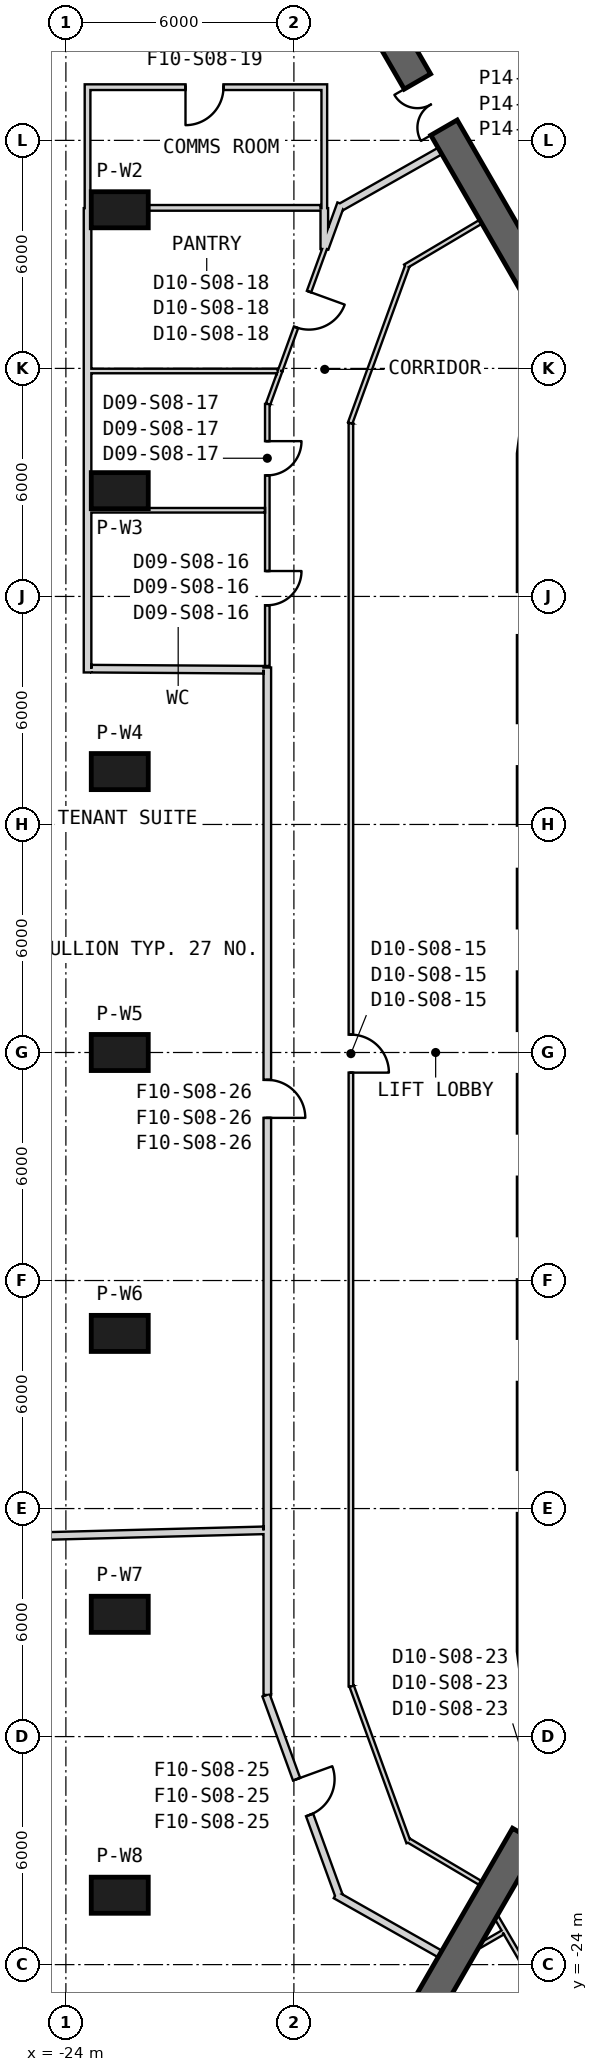
"""IFC4 building model, lengths in metres.
Left out: names, types, materials, properties, quantities, classifications, styles, units other than length and angle.
Written with IfcOpenShell. Run it as: python <this file> out.ifc"""

import sys

from ifc_helpers import new_model, si_unit, direction, frame, frame_2d, origin, origin_2d, place, context, subcontext, project, spatial, polyline, rectangle, outline, extrude, element, fill, save


model = new_model("IFC4")
c1 = context("Model", 3, precision=1e-05, world=origin(), true_north=direction((0.0, 1.0)))
c2 = subcontext(c1, "Body", "Model", "MODEL_VIEW")
j1 = project(units=[si_unit("LENGTHUNIT", "METRE"), si_unit("PLANEANGLEUNIT", "RADIAN")], contexts=[c1])
p1 = place(None, origin())
s1 = spatial("IfcSite", under=j1, at=p1, CompositionType="ELEMENT")
p2 = place(p1, origin())
s2 = spatial("IfcBuilding", under=s1, at=p2, CompositionType="ELEMENT")
p3 = place(p2, frame((0.0, 0.0, 143.9)))
s3 = spatial("IfcBuildingStorey", under=s2, at=p3, CompositionType="ELEMENT", Elevation=143.9)
for number, where, z_axis, x_axis in (
    (1, (-22.583, 22.174, 0.0), (0.0, 0.0, 1.0), (-1.0, 0.0, 0.0)),
    (2, (-22.583, 14.783, 0.0), (0.0, 0.0, 1.0), (-1.0, 0.0, 0.0)),
    (3, (-22.583, 7.391, 0.0), (0.0, 0.0, 1.0), (-1.0, 0.0, 0.0)),
    (4, (-22.583, 0.0, 0.0), (0.0, 0.0, 1.0), (-1.0, 0.0, 0.0)),
    (5, (-22.583, -7.391, 0.0), (0.0, 0.0, 1.0), (-1.0, 0.0, 0.0)),
    (6, (-22.583, -14.783, 0.0), (0.0, 0.0, 1.0), (-1.0, 0.0, 0.0)),
    (7, (-22.583, -22.174, 0.0), (0.0, 0.0, 1.0), (-1.0, 0.0, 0.0)),
):
    element("IfcColumn", number, at=place(p3, frame(where, z_axis=z_axis, x_axis=x_axis)), inside=s3, PredefinedType="COLUMN", context=c2, shape_type="SweptSolid", body=[
        extrude(rectangle(XDim=1.5, YDim=0.95, at=origin_2d()), origin(), (0.0, 0.0, 1.0), 4.1),
    ])
p4 = place(p3, frame((-11.65, 15.762, 0.0), z_axis=(0.0, 0.0, 1.0), x_axis=(0.0, -1.0, 0.0)))
e8 = element("IfcWall", 8, at=p4, inside=s3, PredefinedType="SHEAR", context=c2, shape_type="SweptSolid", body=[
    extrude(rectangle(XDim=31.523, YDim=0.9, at=frame_2d((15.762, 0.0))), origin(), (0.0, 0.0, 1.0), 4.1),
])
p5 = place(p4, frame((7.062, 0.0, 0.0)))
e9 = element("IfcOpeningElement", 9, at=p5, cuts=e8, PredefinedType="OPENING", context=c2, shape_type="SweptSolid", body=[
    extrude(rectangle(XDim=1.2, YDim=2.4, at=frame_2d((0.6, 1.2))), frame((0.0, 0.46, 0.0), z_axis=(0.0, -1.0, 0.0), x_axis=(1.0, 0.0, 0.0)), (0.0, 0.0, 1.0), 0.92),
])
p6 = place(p4, frame((9.762, 0.0, 0.0)))
e10 = element("IfcOpeningElement", 10, at=p6, cuts=e8, PredefinedType="OPENING", context=c2, shape_type="SweptSolid", body=[
    extrude(rectangle(XDim=1.2, YDim=2.4, at=frame_2d((0.6, 1.2))), frame((0.0, 0.46, 0.0), z_axis=(0.0, -1.0, 0.0), x_axis=(1.0, 0.0, 0.0)), (0.0, 0.0, 1.0), 0.92),
])
p7 = place(p4, frame((12.462, 0.0, 0.0)))
e11 = element("IfcOpeningElement", 11, at=p7, cuts=e8, PredefinedType="OPENING", context=c2, shape_type="SweptSolid", body=[
    extrude(rectangle(XDim=1.2, YDim=2.4, at=frame_2d((0.6, 1.2))), frame((0.0, 0.46, 0.0), z_axis=(0.0, -1.0, 0.0), x_axis=(1.0, 0.0, 0.0)), (0.0, 0.0, 1.0), 0.92),
])
p8 = place(p4, frame((15.162, 0.0, 0.0)))
e12 = element("IfcOpeningElement", 12, at=p8, cuts=e8, PredefinedType="OPENING", context=c2, shape_type="SweptSolid", body=[
    extrude(rectangle(XDim=1.2, YDim=2.4, at=frame_2d((0.6, 1.2))), frame((0.0, 0.46, 0.0), z_axis=(0.0, -1.0, 0.0), x_axis=(1.0, 0.0, 0.0)), (0.0, 0.0, 1.0), 0.92),
])
p9 = place(p4, frame((17.862, 0.0, 0.0)))
e13 = element("IfcOpeningElement", 13, at=p9, cuts=e8, PredefinedType="OPENING", context=c2, shape_type="SweptSolid", body=[
    extrude(rectangle(XDim=1.2, YDim=2.4, at=frame_2d((0.6, 1.2))), frame((0.0, 0.46, 0.0), z_axis=(0.0, -1.0, 0.0), x_axis=(1.0, 0.0, 0.0)), (0.0, 0.0, 1.0), 0.92),
])
p10 = place(p4, frame((20.562, 0.0, 0.0)))
e14 = element("IfcOpeningElement", 14, at=p10, cuts=e8, PredefinedType="OPENING", context=c2, shape_type="SweptSolid", body=[
    extrude(rectangle(XDim=1.2, YDim=2.4, at=frame_2d((0.6, 1.2))), frame((0.0, 0.46, 0.0), z_axis=(0.0, -1.0, 0.0), x_axis=(1.0, 0.0, 0.0)), (0.0, 0.0, 1.0), 0.92),
])
p11 = place(p4, frame((23.262, 0.0, 0.0)))
e15 = element("IfcOpeningElement", 15, at=p11, cuts=e8, PredefinedType="OPENING", context=c2, shape_type="SweptSolid", body=[
    extrude(rectangle(XDim=1.2, YDim=2.4, at=frame_2d((0.6, 1.2))), frame((0.0, 0.46, 0.0), z_axis=(0.0, -1.0, 0.0), x_axis=(1.0, 0.0, 0.0)), (0.0, 0.0, 1.0), 0.92),
])
p12 = place(p4, frame((3.612, 0.0, 0.0)))
e16 = element("IfcOpeningElement", 16, at=p12, cuts=e8, PredefinedType="OPENING", context=c2, shape_type="SweptSolid", body=[
    extrude(rectangle(XDim=1.2, YDim=2.4, at=frame_2d((0.6, 1.2))), frame((0.0, 0.46, 0.0), z_axis=(0.0, -1.0, 0.0), x_axis=(1.0, 0.0, 0.0)), (0.0, 0.0, 1.0), 0.92),
])
p13 = place(p4, frame((26.712, 0.0, 0.0)))
e17 = element("IfcOpeningElement", 17, at=p13, cuts=e8, PredefinedType="OPENING", context=c2, shape_type="SweptSolid", body=[
    extrude(rectangle(XDim=1.2, YDim=2.4, at=frame_2d((0.6, 1.2))), frame((0.0, 0.46, 0.0), z_axis=(0.0, -1.0, 0.0), x_axis=(1.0, 0.0, 0.0)), (0.0, 0.0, 1.0), 0.92),
])
p14 = place(p3, origin())
e18 = element("IfcWall", 18, at=p14, inside=s3, PredefinedType="SHEAR", context=c2, shape_type="SweptSolid", body=[
    extrude(outline(polyline([(-7.6, 18.36), (-8.323, 18.659), (-9.1, 18.762), (-9.876, 18.659), (-10.6, 18.36), (-11.221, 17.883), (-11.698, 17.262), (-11.998, 16.538), (-12.1, 15.762), (-11.2, 15.762), (-11.128, 16.305), (-10.919, 16.812), (-10.585, 17.247), (-10.15, 17.58), (-9.644, 17.79), (-9.1, 17.862), (-8.556, 17.79), (-8.05, 17.58), (-7.6, 18.36)])), origin(), (0.0, 0.0, 1.0), 4.1),
])
p15 = place(p3, origin())
e19 = element("IfcWall", 19, at=p15, inside=s3, PredefinedType="SHEAR", context=c2, shape_type="SweptSolid", body=[
    extrude(outline(polyline([(-12.1, -15.762), (-11.998, -16.538), (-11.698, -17.262), (-11.221, -17.883), (-10.6, -18.36), (-9.876, -18.659), (-9.1, -18.762), (-8.323, -18.659), (-7.6, -18.36), (-8.05, -17.58), (-8.556, -17.79), (-9.1, -17.862), (-9.644, -17.79), (-10.15, -17.58), (-10.585, -17.247), (-10.919, -16.812), (-11.128, -16.305), (-11.2, -15.762), (-12.1, -15.762)])), origin(), (0.0, 0.0, 1.0), 4.1),
])
p16 = place(p3, frame((-10.575, 18.316, 0.0), z_axis=(0.0, 0.0, 1.0), x_axis=(-0.500002326941, 0.86602406032, 0.0)))
e20 = element("IfcWall", 20, at=p16, inside=s3, PredefinedType="SHEAR", context=c2, shape_type="SweptSolid", body=[
    extrude(rectangle(XDim=12.384, YDim=0.8, at=frame_2d((6.192, 0.0))), origin(), (0.0, 0.0, 1.0), 4.1),
])
p17 = place(p16, frame((6.95, 0.0, 0.0)))
e21 = element("IfcOpeningElement", 21, at=p17, cuts=e20, PredefinedType="OPENING", context=c2, shape_type="SweptSolid", body=[
    extrude(rectangle(XDim=1.4, YDim=2.4, at=frame_2d((0.7, 1.2))), frame((0.0, 0.41, 0.0), z_axis=(0.0, -1.0, 0.0), x_axis=(1.0, 0.0, 0.0)), (0.0, 0.0, 1.0), 0.82),
])
p18 = place(p3, frame((-10.575, -18.316, 0.0), z_axis=(0.0, 0.0, 1.0), x_axis=(-0.500002326941, -0.86602406032, 0.0)))
e22 = element("IfcWall", 22, at=p18, inside=s3, PredefinedType="SHEAR", context=c2, shape_type="SweptSolid", body=[
    extrude(rectangle(XDim=12.384, YDim=0.8, at=frame_2d((6.192, 0.0))), origin(), (0.0, 0.0, 1.0), 4.1),
])
p19 = place(p18, frame((1.25, 0.0, 0.0)))
e23 = element("IfcOpeningElement", 23, at=p19, cuts=e22, PredefinedType="OPENING", context=c2, shape_type="SweptSolid", body=[
    extrude(rectangle(XDim=1.4, YDim=2.4, at=frame_2d((0.7, 1.2))), frame((0.0, 0.41, 0.0), z_axis=(0.0, -1.0, 0.0), x_axis=(1.0, 0.0, 0.0)), (0.0, 0.0, 1.0), 0.82),
])
p20 = place(p3, frame((-13.082, 21.859, 0.0), z_axis=(0.0, 0.0, 1.0), x_axis=(-0.860286384661, -0.509811079095, 0.0)))
e24 = element("IfcWall", 24, at=p20, inside=s3, PredefinedType="PARTITIONING", context=c2, shape_type="SweptSolid", body=[
    extrude(rectangle(XDim=2.311, YDim=0.12, at=frame_2d((1.155, 0.0))), origin(), (0.0, 0.0, 1.0), 3.8),
])
p21 = place(p3, frame((-15.017, 20.692, 0.0), z_axis=(0.0, 0.0, 1.0), x_axis=(-0.342028368186, -0.939689627141, 0.0)))
e25 = element("IfcWall", 25, at=p21, inside=s3, PredefinedType="PARTITIONING", context=c2, shape_type="SweptSolid", body=[
    extrude(rectangle(XDim=4.397, YDim=0.12, at=frame_2d((2.198, 0.0))), origin(), (0.0, 0.0, 1.0), 2.88),
])
p22 = place(p3, frame((-16.5, 16.557, 0.0), z_axis=(0.0, 0.0, 1.0), x_axis=(0.0, -1.0, 0.0)))
e26 = element("IfcWall", 26, at=p22, inside=s3, PredefinedType="PARTITIONING", context=c2, shape_type="SweptSolid", body=[
    extrude(rectangle(XDim=33.234, YDim=0.12, at=frame_2d((16.617, 0.0))), origin(), (0.0, 0.0, 1.0), 2.98),
])
p23 = place(p22, frame((16.087, 0.0, 0.0)))
e27 = element("IfcOpeningElement", 27, at=p23, cuts=e26, PredefinedType="OPENING", context=c2, shape_type="SweptSolid", body=[
    extrude(rectangle(XDim=1.0, YDim=2.1, at=frame_2d((0.5, 1.05))), frame((0.0, 0.07, 0.0), z_axis=(0.0, -1.0, 0.0), x_axis=(1.0, 0.0, 0.0)), (0.0, 0.0, 1.0), 0.14),
])
p24 = place(p3, frame((-16.479, -16.673, 0.0), z_axis=(0.0, 0.0, 1.0), x_axis=(0.342025144217, -0.939690800595, 0.0)))
e28 = element("IfcWall", 28, at=p24, inside=s3, PredefinedType="PARTITIONING", context=c2, shape_type="SweptSolid", body=[
    extrude(rectangle(XDim=4.378, YDim=0.12, at=frame_2d((2.189, 0.0))), origin(), (0.0, 0.0, 1.0), 2.88),
])
p25 = place(p3, frame((-14.983, -20.732, 0.0), z_axis=(0.0, 0.0, 1.0), x_axis=(0.860268204019, -0.509841756973, 0.0)))
e29 = element("IfcWall", 29, at=p25, inside=s3, PredefinedType="PARTITIONING", context=c2, shape_type="SweptSolid", body=[
    extrude(rectangle(XDim=2.21, YDim=0.12, at=frame_2d((1.105, 0.0))), origin(), (0.0, 0.0, 1.0), 3.8),
])
p26 = place(p3, frame((-16.903, -22.166, 0.0), z_axis=(0.0, 0.0, 1.0), x_axis=(0.870335069356, -0.492460015686, 0.0)))
e30 = element("IfcWall", 30, at=p26, inside=s3, PredefinedType="PARTITIONING", context=c2, shape_type="SweptSolid", body=[
    extrude(rectangle(XDim=3.156, YDim=0.2, at=frame_2d((1.578, 0.0))), origin(), (0.0, 0.0, 1.0), 2.88),
])
p27 = place(p3, frame((-18.734, -16.911, 0.0), z_axis=(0.0, 0.0, 1.0), x_axis=(0.342022840992, -0.939691638911, 0.0)))
e31 = element("IfcWall", 31, at=p27, inside=s3, PredefinedType="PARTITIONING", context=c2, shape_type="SweptSolid", body=[
    extrude(rectangle(XDim=5.605, YDim=0.2, at=frame_2d((2.802, 0.0))), origin(), (0.0, 0.0, 1.0), 2.88),
])
p28 = place(p27, frame((2.352, 0.0, 0.0)))
e32 = element("IfcOpeningElement", 32, at=p28, cuts=e31, PredefinedType="OPENING", context=c2, shape_type="SweptSolid", body=[
    extrude(rectangle(XDim=1.0, YDim=2.1, at=frame_2d((0.5, 1.05))), frame((0.0, 0.11, 0.0), z_axis=(0.0, -1.0, 0.0), x_axis=(1.0, 0.0, 0.0)), (0.0, 0.0, 1.0), 0.22),
])
p29 = place(p3, frame((-18.7, 10.13, 0.0), z_axis=(0.0, 0.0, 1.0), x_axis=(0.0, -1.0, 0.0)))
e33 = element("IfcWall", 33, at=p29, inside=s3, PredefinedType="PARTITIONING", context=c2, shape_type="SweptSolid", body=[
    extrude(rectangle(XDim=27.035, YDim=0.2, at=frame_2d((13.517, 0.0))), origin(), (0.0, 0.0, 1.0), 3.08),
])
p30 = place(p29, frame((10.85, 0.0, 0.0)))
e34 = element("IfcOpeningElement", 34, at=p30, cuts=e33, PredefinedType="OPENING", context=c2, shape_type="SweptSolid", body=[
    extrude(rectangle(XDim=1.0, YDim=2.1, at=frame_2d((0.5, 1.05))), frame((0.0, 0.11, 0.0), z_axis=(0.0, -1.0, 0.0), x_axis=(1.0, 0.0, 0.0)), (0.0, 0.0, 1.0), 0.22),
])
p31 = place(p3, frame((-16.76, 22.333, 0.0), z_axis=(0.0, 0.0, 1.0), x_axis=(-0.342041387985, -0.93968488809, 0.0)))
e35 = element("IfcWall", 35, at=p31, inside=s3, PredefinedType="PARTITIONING", context=c2, shape_type="SweptSolid", body=[
    extrude(rectangle(XDim=1.248, YDim=0.2, at=frame_2d((0.624, 0.0))), origin(), (0.0, 0.0, 1.0), 2.88),
])
p32 = place(p3, frame((-14.156, 23.719, 0.0), z_axis=(0.0, 0.0, 1.0), x_axis=(-0.870320915518, -0.492485029226, 0.0)))
e36 = element("IfcWall", 36, at=p32, inside=s3, PredefinedType="PARTITIONING", context=c2, shape_type="SweptSolid", body=[
    extrude(rectangle(XDim=2.99, YDim=0.2, at=frame_2d((1.495, 0.0))), origin(), (0.0, 0.0, 1.0), 2.88),
])
p33 = place(p3, frame((-18.7, 17.065, 0.0), z_axis=(0.0, 0.0, 1.0), x_axis=(0.0, -1.0, 0.0)))
e37 = element("IfcWall", 37, at=p33, inside=s3, PredefinedType="PARTITIONING", context=c2, shape_type="SweptSolid", body=[
    extrude(rectangle(XDim=6.895, YDim=0.12, at=frame_2d((3.447, 0.0))), origin(), (0.0, 0.0, 1.0), 3.08),
])
p34 = place(p33, frame((4.396, 0.0, 0.0)))
e38 = element("IfcOpeningElement", 38, at=p34, cuts=e37, PredefinedType="OPENING", context=c2, shape_type="SweptSolid", body=[
    extrude(rectangle(XDim=0.9, YDim=2.1, at=frame_2d((0.45, 1.05))), frame((0.0, 0.07, 0.0), z_axis=(0.0, -1.0, 0.0), x_axis=(1.0, 0.0, 0.0)), (0.0, 0.0, 1.0), 0.14),
])
p35 = place(p33, frame((0.979, 0.0, 0.0)))
e39 = element("IfcOpeningElement", 39, at=p35, cuts=e37, PredefinedType="OPENING", context=c2, shape_type="SweptSolid", body=[
    extrude(rectangle(XDim=0.9, YDim=2.1, at=frame_2d((0.45, 1.05))), frame((0.0, 0.07, 0.0), z_axis=(0.0, -1.0, 0.0), x_axis=(1.0, 0.0, 0.0)), (0.0, 0.0, 1.0), 0.14),
])
p36 = place(p3, frame((-17.188, 21.16, 0.0), z_axis=(0.0, 0.0, 1.0), x_axis=(-0.342046352126, -0.939683081149, 0.0)))
e40 = element("IfcWall", 40, at=p36, inside=s3, PredefinedType="PARTITIONING", context=c2, shape_type="SweptSolid", body=[
    extrude(rectangle(XDim=3.425, YDim=0.12, at=frame_2d((1.713, 0.0))), origin(), (0.0, 0.0, 1.0), 2.98),
])
p37 = place(p36, frame((1.213, 0.0, 0.0)))
e41 = element("IfcOpeningElement", 41, at=p37, cuts=e40, PredefinedType="OPENING", context=c2, shape_type="SweptSolid", body=[
    extrude(rectangle(XDim=1.0, YDim=2.1, at=frame_2d((0.5, 1.05))), frame((0.0, 0.07, 0.0), z_axis=(0.0, -1.0, 0.0), x_axis=(1.0, 0.0, 0.0)), (0.0, 0.0, 1.0), 0.14),
])
p38 = place(p3, frame((-18.359, 17.941, 0.0), z_axis=(0.0, 0.0, 1.0), x_axis=(-0.341910451958, -0.939732537929, 0.0)))
e42 = element("IfcWall", 42, at=p38, inside=s3, PredefinedType="PARTITIONING", context=c2, shape_type="SweptSolid", body=[
    extrude(rectangle(XDim=0.937, YDim=0.12, at=frame_2d((0.468, 0.0))), origin(), (0.0, 0.0, 1.0), 2.98),
])
p39 = place(p3, frame((-25.457, -12.746, 0.0), z_axis=(0.0, 0.0, 1.0), x_axis=(0.999663993994, 0.025921016788, 0.0)))
e43 = element("IfcWall", 43, at=p39, inside=s3, PredefinedType="PARTITIONING", context=c2, shape_type="SweptSolid", body=[
    extrude(rectangle(XDim=6.659, YDim=0.2, at=frame_2d((3.33, 0.0))), origin(), (0.0, 0.0, 1.0), 3.08),
])
p40 = place(p3, frame((-23.43, 10.0, 0.0), z_axis=(0.0, 0.0, 1.0), x_axis=(0.0, 1.0, 0.0)))
e44 = element("IfcWall", 44, at=p40, inside=s3, PredefinedType="PARTITIONING", context=c2, shape_type="SweptSolid", body=[
    extrude(rectangle(XDim=7.932, YDim=0.2, at=frame_2d((3.966, 0.0))), origin(), (0.0, 0.0, 1.0), 3.8),
])
p41 = place(p3, frame((-23.43, 17.932, 0.0), z_axis=(0.0, 0.0, 1.0), x_axis=(0.0, 1.0, 0.0)))
e45 = element("IfcWall", 45, at=p41, inside=s3, PredefinedType="PARTITIONING", context=c2, shape_type="SweptSolid", body=[
    extrude(rectangle(XDim=4.285, YDim=0.2, at=frame_2d((2.142, 0.0))), origin(), (0.0, 0.0, 1.0), 3.8),
])
p42 = place(p3, frame((-23.33, 10.099, 0.0), z_axis=(0.0, 0.0, 1.0), x_axis=(0.999979779172, -0.006359343247, 0.0)))
e46 = element("IfcWall", 46, at=p42, inside=s3, PredefinedType="PARTITIONING", context=c2, shape_type="SweptSolid", body=[
    extrude(rectangle(XDim=4.53, YDim=0.2, at=frame_2d((2.265, 0.0))), origin(), (0.0, 0.0, 1.0), 3.8),
])
p43 = place(p3, frame((-17.2, 21.141, 0.0), z_axis=(0.0, 0.0, 1.0), x_axis=(0.0, 1.0, 0.0)))
e47 = element("IfcWall", 47, at=p43, inside=s3, PredefinedType="PARTITIONING", context=c2, shape_type="SweptSolid", body=[
    extrude(rectangle(XDim=1.075, YDim=0.2, at=frame_2d((0.538, 0.0))), origin(), (0.0, 0.0, 1.0), 2.88),
])
p44 = place(p3, frame((-17.2, 22.217, 0.0), z_axis=(0.0, 0.0, 1.0), x_axis=(0.0, 1.0, 0.0)))
e48 = element("IfcWall", 48, at=p44, inside=s3, PredefinedType="PLUMBINGWALL", context=c2, shape_type="SweptSolid", body=[
    extrude(rectangle(XDim=3.259, YDim=0.15, at=frame_2d((1.629, 0.0))), origin(), (0.0, 0.0, 1.0), 2.88),
])
p45 = place(p3, frame((-17.275, 25.4, 0.0), z_axis=(0.0, 0.0, 1.0), x_axis=(-1.0, 0.0, 0.0)))
e49 = element("IfcWall", 49, at=p45, inside=s3, PredefinedType="PLUMBINGWALL", context=c2, shape_type="SweptSolid", body=[
    extrude(rectangle(XDim=6.23, YDim=0.15, at=frame_2d((3.115, 0.0))), origin(), (0.0, 0.0, 1.0), 2.88),
])
p46 = place(p45, frame((2.577, 0.0, 0.0)))
e50 = element("IfcOpeningElement", 50, at=p46, cuts=e49, PredefinedType="OPENING", context=c2, shape_type="SweptSolid", body=[
    extrude(rectangle(XDim=1.0, YDim=2.1, at=frame_2d((0.5, 1.05))), frame((0.0, 0.085, 0.0), z_axis=(0.0, -1.0, 0.0), x_axis=(1.0, 0.0, 0.0)), (0.0, 0.0, 1.0), 0.17),
])
p47 = place(p3, frame((-23.43, 22.217, 0.0), z_axis=(0.0, 0.0, 1.0), x_axis=(0.0, 1.0, 0.0)))
e51 = element("IfcWall", 51, at=p47, inside=s3, PredefinedType="PLUMBINGWALL", context=c2, shape_type="SweptSolid", body=[
    extrude(rectangle(XDim=3.108, YDim=0.15, at=frame_2d((1.554, 0.0))), origin(), (0.0, 0.0, 1.0), 3.8),
])
p48 = place(p3, frame((-18.76, 14.267, 0.0), z_axis=(0.0, 0.0, 1.0), x_axis=(-1.0, 0.0, 0.0)))
e52 = element("IfcWall", 52, at=p48, inside=s3, PredefinedType="PARTITIONING", context=c2, shape_type="SweptSolid", body=[
    extrude(rectangle(XDim=4.57, YDim=0.12, at=frame_2d((2.285, 0.0))), origin(), (0.0, 0.0, 1.0), 3.08),
])
p49 = place(p3, frame((-23.33, 17.932, 0.0), z_axis=(0.0, 0.0, 1.0), x_axis=(1.0, 0.0, 0.0)))
e53 = element("IfcWall", 53, at=p49, inside=s3, PredefinedType="PARTITIONING", context=c2, shape_type="SweptSolid", body=[
    extrude(rectangle(XDim=4.904, YDim=0.12, at=frame_2d((2.452, 0.0))), origin(), (0.0, 0.0, 1.0), 2.98),
])
p50 = place(p3, frame((-17.3, 22.224, 0.0), z_axis=(0.0, 0.0, 1.0), x_axis=(-1.0, 0.0, 0.0)))
e54 = element("IfcWall", 54, at=p50, inside=s3, PredefinedType="PLUMBINGWALL", context=c2, shape_type="SweptSolid", body=[
    extrude(rectangle(XDim=6.03, YDim=0.15, at=frame_2d((3.015, 0.0))), origin(), (0.0, 0.0, 1.0), 3.8),
])
p51 = place(p3, frame((-12.673, -22.75, 0.0), z_axis=(0.0, 0.0, 1.0), x_axis=(0.504751362892, -0.863264769152, 0.0)))
e55 = element("IfcWall", 55, at=p51, inside=s3, PredefinedType="PARTITIONING", context=c2, shape_type="SweptSolid", body=[
    extrude(rectangle(XDim=5.775, YDim=0.12, at=frame_2d((2.887, 0.0))), origin(), (0.0, 0.0, 1.0), 2.88),
])
p52 = place(p3, frame((-12.505, -23.155, 0.0), z_axis=(0.0, 0.0, 1.0), x_axis=(-0.866138803259, -0.49980353489, 0.0)))
e56 = element("IfcWall", 56, at=p52, inside=s3, PredefinedType="PARTITIONING", context=c2, shape_type="SweptSolid", body=[
    extrude(rectangle(XDim=0.695, YDim=0.12, at=frame_2d((0.348, 0.0))), origin(), (0.0, 0.0, 1.0), 3.8),
])
p53 = place(p23, origin())
e57 = element("IfcDoor", 57, at=p53, inside=s3, OperationType="SINGLE_SWING_RIGHT", PredefinedType="NOTDEFINED", context=c2, shape_type="SweptSolid", body=[
    extrude(rectangle(XDim=1.0, YDim=2.1, at=frame_2d((0.5, 1.05))), frame((0.0, 0.025, 0.0), z_axis=(0.0, -1.0, 0.0), x_axis=(1.0, 0.0, 0.0)), (0.0, 0.0, 1.0), 0.05),
])
fill(e27, e57)
p54 = place(p34, origin())
e58 = element("IfcDoor", 58, at=p54, inside=s3, OperationType="SINGLE_SWING_LEFT", PredefinedType="NOTDEFINED", context=c2, shape_type="SweptSolid", body=[
    extrude(rectangle(XDim=0.9, YDim=2.1, at=frame_2d((0.45, 1.05))), frame((0.0, 0.025, 0.0), z_axis=(0.0, -1.0, 0.0), x_axis=(1.0, 0.0, 0.0)), (0.0, 0.0, 1.0), 0.05),
])
fill(e38, e58)
p55 = place(p35, origin())
e59 = element("IfcDoor", 59, at=p55, inside=s3, OperationType="SINGLE_SWING_LEFT", PredefinedType="NOTDEFINED", context=c2, shape_type="SweptSolid", body=[
    extrude(rectangle(XDim=0.9, YDim=2.1, at=frame_2d((0.45, 1.05))), frame((0.0, 0.025, 0.0), z_axis=(0.0, -1.0, 0.0), x_axis=(1.0, 0.0, 0.0)), (0.0, 0.0, 1.0), 0.05),
])
fill(e39, e59)
p56 = place(p37, origin())
e60 = element("IfcDoor", 60, at=p56, inside=s3, OperationType="SINGLE_SWING_RIGHT", PredefinedType="NOTDEFINED", context=c2, shape_type="SweptSolid", body=[
    extrude(rectangle(XDim=1.0, YDim=2.1, at=frame_2d((0.5, 1.05))), frame((0.0, 0.025, 0.0), z_axis=(0.0, -1.0, 0.0), x_axis=(1.0, 0.0, 0.0)), (0.0, 0.0, 1.0), 0.05),
])
fill(e41, e60)
p57 = place(p46, origin())
e61 = element("IfcDoor", 61, at=p57, inside=s3, OperationType="SINGLE_SWING_LEFT", PredefinedType="USERDEFINED", context=c2, shape_type="SweptSolid", body=[
    extrude(rectangle(XDim=1.0, YDim=2.1, at=frame_2d((0.5, 1.05))), frame((0.0, 0.025, 0.0), z_axis=(0.0, -1.0, 0.0), x_axis=(1.0, 0.0, 0.0)), (0.0, 0.0, 1.0), 0.05),
])
fill(e50, e61)
p58 = place(p28, origin())
e62 = element("IfcDoor", 62, at=p58, inside=s3, OperationType="SINGLE_SWING_RIGHT", PredefinedType="USERDEFINED", context=c2, shape_type="SweptSolid", body=[
    extrude(rectangle(XDim=1.0, YDim=2.1, at=frame_2d((0.5, 1.05))), frame((0.0, 0.025, 0.0), z_axis=(0.0, -1.0, 0.0), x_axis=(1.0, 0.0, 0.0)), (0.0, 0.0, 1.0), 0.05),
])
fill(e32, e62)
p59 = place(p30, origin())
e63 = element("IfcDoor", 63, at=p59, inside=s3, OperationType="SINGLE_SWING_LEFT", PredefinedType="USERDEFINED", context=c2, shape_type="SweptSolid", body=[
    extrude(rectangle(XDim=1.0, YDim=2.1, at=frame_2d((0.5, 1.05))), frame((0.0, 0.025, 0.0), z_axis=(0.0, -1.0, 0.0), x_axis=(1.0, 0.0, 0.0)), (0.0, 0.0, 1.0), 0.05),
])
fill(e34, e63)
p60 = place(p17, origin())
e64 = element("IfcDoor", 64, at=p60, inside=s3, OperationType="DOUBLE_DOOR_SINGLE_SWING", PredefinedType="NOTDEFINED", context=c2, shape_type="SweptSolid", body=[
    extrude(rectangle(XDim=1.4, YDim=2.4, at=frame_2d((0.7, 1.2))), frame((0.0, 0.025, 0.0), z_axis=(0.0, -1.0, 0.0), x_axis=(1.0, 0.0, 0.0)), (0.0, 0.0, 1.0), 0.05),
])
fill(e21, e64)
save(model, sys.argv[1])
